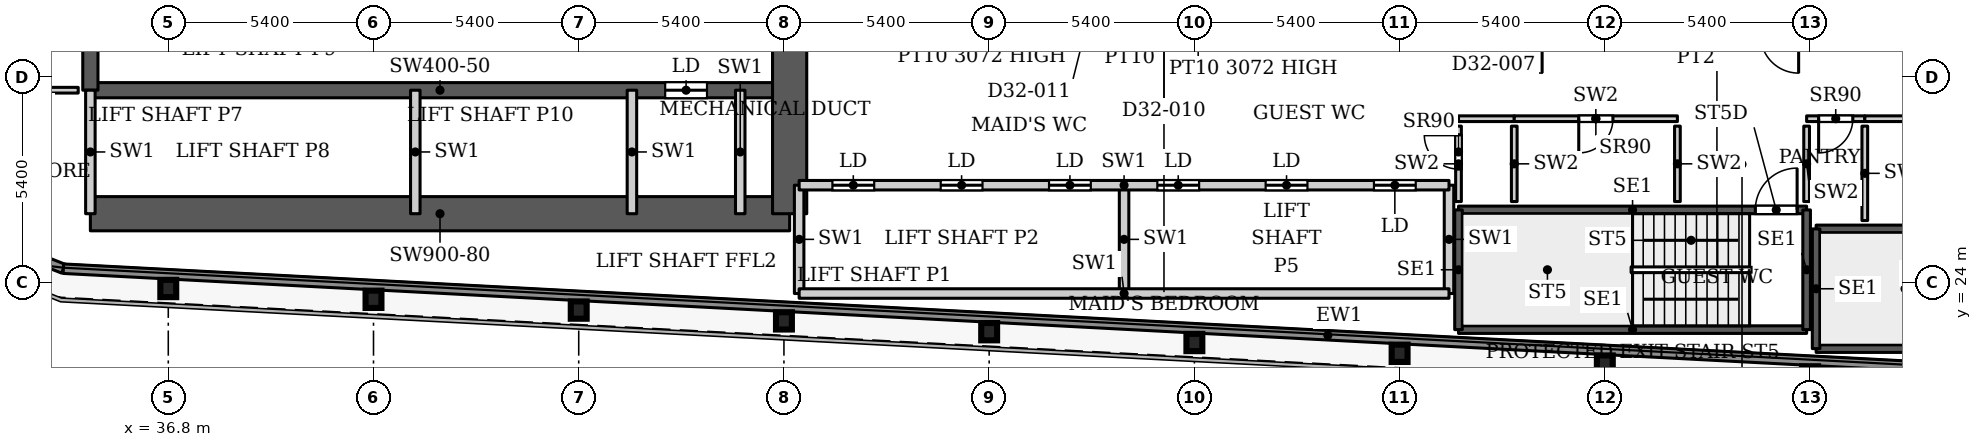
"""IFC4 building model, lengths in metres.
Left out: names, types, materials, properties, quantities, classifications, styles, units other than length and angle.
Written with IfcOpenShell. Run it as: python <this file> out.ifc"""

import sys

from ifc_helpers import new_model, si_unit, direction, frame, frame_2d, origin, origin_2d, place, context, subcontext, project, spatial, rectangle, i_section, extrude, source, transform, mapped, element, fill, save


model = new_model("IFC4")
c1 = context("Model", 3, precision=1e-05, world=origin(), true_north=direction((0.0, 1.0)))
c2 = subcontext(c1, "Body", "Model", "MODEL_VIEW")
j1 = project(units=[si_unit("LENGTHUNIT", "METRE"), si_unit("PLANEANGLEUNIT", "RADIAN")], contexts=[c1])
p1 = place(None, origin())
s1 = spatial("IfcSite", under=j1, at=p1, CompositionType="ELEMENT")
p2 = place(p1, origin())
s2 = spatial("IfcBuilding", under=s1, at=p2, CompositionType="ELEMENT")
p3 = place(p2, frame((0.0, 0.0, 137.0)))
s3 = spatial("IfcBuildingStorey", under=s2, at=p3, CompositionType="ELEMENT", Elevation=137.0)
for number, where, z_axis, x_axis in (
    (1, (80.0, 21.558, 0.0), (0.0, 0.0, 1.0), (1.0, 0.0, 0.0)),
    (2, (74.6, 21.843, 0.0), (0.0, 0.0, 1.0), (1.0, 0.0, 0.0)),
    (3, (69.2, 22.127, 0.0), (0.0, 0.0, 1.0), (1.0, 0.0, 0.0)),
    (4, (63.8, 22.411, 0.0), (0.0, 0.0, 1.0), (1.0, 0.0, 0.0)),
    (5, (58.4, 22.695, 0.0), (0.0, 0.0, 1.0), (1.0, 0.0, 0.0)),
    (6, (53.0, 22.98, 0.0), (0.0, 0.0, 1.0), (1.0, 0.0, 0.0)),
    (7, (47.6, 23.264, 0.0), (0.0, 0.0, 1.0), (1.0, 0.0, 0.0)),
    (8, (42.2, 23.548, 0.0), (0.0, 0.0, 1.0), (1.0, 0.0, 0.0)),
    (9, (36.8, 23.832, 0.0), (0.0, 0.0, 1.0), (1.0, 0.0, 0.0)),
):
    element("IfcColumn", number, at=place(p3, frame(where, z_axis=z_axis, x_axis=x_axis)), inside=s3, PredefinedType="COLUMN", context=c2, shape_type="SweptSolid", body=[
        extrude(i_section(OverallWidth=0.418, OverallDepth=0.455, WebThickness=0.042, FlangeThickness=0.068, FilletRadius=0.014, at=origin_2d()), origin(), (0.0, 0.0, 1.0), 3.9),
    ])
p4 = place(p3, frame((34.75, 25.8, 0.0), z_axis=(0.0, 0.0, 1.0), x_axis=(1.0, 0.0, 0.0)))
e10 = element("IfcWall", 10, at=p4, inside=s3, PredefinedType="SHEAR", context=c2, shape_type="SweptSolid", body=[
    extrude(rectangle(XDim=18.4, YDim=0.9, at=frame_2d((9.2, 0.0))), origin(), (0.0, 0.0, 1.0), 3.9),
])
p5 = place(p3, frame((34.75, 29.05, 0.0), z_axis=(0.0, 0.0, 1.0), x_axis=(1.0, 0.0, 0.0)))
e11 = element("IfcWall", 11, at=p5, inside=s3, PredefinedType="SHEAR", context=c2, shape_type="SweptSolid", body=[
    extrude(rectangle(XDim=18.4, YDim=0.4, at=frame_2d((9.2, 0.0))), origin(), (0.0, 0.0, 1.0), 3.9),
])
p6 = place(p5, frame((15.125, 0.0, 0.0)))
e12 = element("IfcOpeningElement", 12, at=p6, cuts=e11, PredefinedType="OPENING", context=c2, shape_type="SweptSolid", body=[
    extrude(rectangle(XDim=1.1, YDim=2.2, at=frame_2d((0.55, 1.1))), frame((0.0, 0.21, 0.0), z_axis=(0.0, -1.0, 0.0), x_axis=(1.0, 0.0, 0.0)), (0.0, 0.0, 1.0), 0.42),
])
p7 = place(p3, frame((34.75, 29.05, 0.0), z_axis=(0.0, 0.0, 1.0), x_axis=(0.0, 1.0, 0.0)))
e13 = element("IfcWall", 13, at=p7, inside=s3, PredefinedType="SHEAR", context=c2, shape_type="SweptSolid", body=[
    extrude(rectangle(XDim=18.45, YDim=0.4, at=frame_2d((9.225, 0.0))), origin(), (0.0, 0.0, 1.0), 3.9),
])
p8 = place(p7, frame((8.025, 0.0, 0.0)))
e14 = element("IfcOpeningElement", 14, at=p8, cuts=e13, PredefinedType="OPENING", context=c2, shape_type="SweptSolid", body=[
    extrude(rectangle(XDim=1.1, YDim=2.2, at=frame_2d((0.55, 1.1))), frame((0.0, 0.21, 0.0), z_axis=(0.0, -1.0, 0.0), x_axis=(1.0, 0.0, 0.0)), (0.0, 0.0, 1.0), 0.42),
])
p9 = place(p7, frame((10.875, 0.0, 0.0)))
e15 = element("IfcOpeningElement", 15, at=p9, cuts=e13, PredefinedType="OPENING", context=c2, shape_type="SweptSolid", body=[
    extrude(rectangle(XDim=1.1, YDim=2.2, at=frame_2d((0.55, 1.1))), frame((0.0, 0.21, 0.0), z_axis=(0.0, -1.0, 0.0), x_axis=(1.0, 0.0, 0.0)), (0.0, 0.0, 1.0), 0.42),
])
p10 = place(p7, frame((13.725, 0.0, 0.0)))
e16 = element("IfcOpeningElement", 16, at=p10, cuts=e13, PredefinedType="OPENING", context=c2, shape_type="SweptSolid", body=[
    extrude(rectangle(XDim=1.1, YDim=2.2, at=frame_2d((0.55, 1.1))), frame((0.0, 0.21, 0.0), z_axis=(0.0, -1.0, 0.0), x_axis=(1.0, 0.0, 0.0)), (0.0, 0.0, 1.0), 0.42),
])
p11 = place(p7, frame((15.95, 0.0, 0.0)))
e17 = element("IfcOpeningElement", 17, at=p11, cuts=e13, PredefinedType="OPENING", context=c2, shape_type="SweptSolid", body=[
    extrude(rectangle(XDim=1.1, YDim=2.2, at=frame_2d((0.55, 1.1))), frame((0.0, 0.21, 0.0), z_axis=(0.0, -1.0, 0.0), x_axis=(1.0, 0.0, 0.0)), (0.0, 0.0, 1.0), 0.42),
])
p12 = place(p3, frame((53.15, 25.8, 0.0), z_axis=(0.0, 0.0, 1.0), x_axis=(0.0, 1.0, 0.0)))
e18 = element("IfcWall", 18, at=p12, inside=s3, PredefinedType="SHEAR", context=c2, shape_type="SweptSolid", body=[
    extrude(rectangle(XDim=10.4, YDim=0.9, at=frame_2d((5.2, 0.0))), origin(), (0.0, 0.0, 1.0), 3.9),
])
p13 = place(p3, frame((34.039, 24.353, 0.0), z_axis=(0.0, 0.0, 1.0), x_axis=(-0.929352825399, 0.369192803184, 0.0)))
e19 = element("IfcWall", 19, at=p13, inside=s3, PredefinedType="SOLIDWALL", context=c2, shape_type="SweptSolid", body=[
    extrude(rectangle(XDim=4.656, YDim=0.25, at=frame_2d((2.328, 0.0))), origin(), (0.0, 0.0, 1.0), 3.75),
])
p14 = place(p3, frame((100.586, 20.85, 0.0), z_axis=(0.0, 0.0, 1.0), x_axis=(-0.99861746497, 0.052565755559, 0.0)))
e20 = element("IfcWall", 20, at=p14, inside=s3, PredefinedType="SOLIDWALL", context=c2, shape_type="SweptSolid", body=[
    extrude(rectangle(XDim=66.639, YDim=0.25, at=frame_2d((33.319, 0.0))), origin(), (0.0, 0.0, 1.0), 3.75),
])
p15 = place(p3, frame((80.16, 22.25, 0.0), z_axis=(0.0, 0.0, 1.0), x_axis=(1.0, 0.0, 0.0)))
e21 = element("IfcWall", 21, at=p15, inside=s3, PredefinedType="SHEAR", context=c2, shape_type="SweptSolid", body=[
    extrude(rectangle(XDim=9.16, YDim=0.2, at=frame_2d((4.58, 0.0))), origin(), (0.0, 0.0, 1.0), 3.9),
])
p16 = place(p3, frame((80.16, 25.4, 0.0), z_axis=(0.0, 0.0, 1.0), x_axis=(1.0, 0.0, 0.0)))
e22 = element("IfcWall", 22, at=p16, inside=s3, PredefinedType="SHEAR", context=c2, shape_type="SweptSolid", body=[
    extrude(rectangle(XDim=9.16, YDim=0.2, at=frame_2d((4.58, 0.0))), origin(), (0.0, 0.0, 1.0), 3.9),
])
p17 = place(p16, frame((7.81, 0.0, 0.0)))
e23 = element("IfcOpeningElement", 23, at=p17, cuts=e22, PredefinedType="OPENING", context=c2, shape_type="SweptSolid", body=[
    extrude(rectangle(XDim=1.1, YDim=2.2, at=frame_2d((0.55, 1.1))), frame((0.0, 0.11, 0.0), z_axis=(0.0, -1.0, 0.0), x_axis=(1.0, 0.0, 0.0)), (0.0, 0.0, 1.0), 0.22),
])
p18 = place(p3, frame((80.16, 22.25, 0.0), z_axis=(0.0, 0.0, 1.0), x_axis=(0.0, 1.0, 0.0)))
e24 = element("IfcWall", 24, at=p18, inside=s3, PredefinedType="SHEAR", context=c2, shape_type="SweptSolid", body=[
    extrude(rectangle(XDim=3.15, YDim=0.2, at=frame_2d((1.575, 0.0))), origin(), (0.0, 0.0, 1.0), 3.9),
])
p19 = place(p3, frame((70.75, 22.75, 0.0), z_axis=(0.0, 0.0, 1.0), x_axis=(1.0, 0.0, 0.0)))
e25 = element("IfcWall", 25, at=p19, inside=s3, PredefinedType="SHEAR", context=c2, shape_type="SweptSolid", body=[
    extrude(rectangle(XDim=9.16, YDim=0.2, at=frame_2d((4.58, 0.0))), origin(), (0.0, 0.0, 1.0), 3.9),
])
p20 = place(p3, frame((70.75, 25.9, 0.0), z_axis=(0.0, 0.0, 1.0), x_axis=(1.0, 0.0, 0.0)))
e26 = element("IfcWall", 26, at=p20, inside=s3, PredefinedType="SHEAR", context=c2, shape_type="SweptSolid", body=[
    extrude(rectangle(XDim=9.16, YDim=0.2, at=frame_2d((4.58, 0.0))), origin(), (0.0, 0.0, 1.0), 3.9),
])
p21 = place(p20, frame((7.81, 0.0, 0.0)))
e27 = element("IfcOpeningElement", 27, at=p21, cuts=e26, PredefinedType="OPENING", context=c2, shape_type="SweptSolid", body=[
    extrude(rectangle(XDim=1.1, YDim=2.2, at=frame_2d((0.55, 1.1))), frame((0.0, 0.11, 0.0), z_axis=(0.0, -1.0, 0.0), x_axis=(1.0, 0.0, 0.0)), (0.0, 0.0, 1.0), 0.22),
])
for number, where, z_axis, x_axis in (
    (28, (70.75, 22.75, 0.0), (0.0, 0.0, 1.0), (0.0, 1.0, 0.0)),
    (29, (79.91, 22.75, 0.0), (0.0, 0.0, 1.0), (0.0, 1.0, 0.0)),
):
    element("IfcWall", number, at=place(p3, frame(where, z_axis=z_axis, x_axis=x_axis)), inside=s3, PredefinedType="SHEAR", context=c2, shape_type="SweptSolid", body=[
        extrude(rectangle(XDim=3.15, YDim=0.2, at=frame_2d((1.575, 0.0))), origin(), (0.0, 0.0, 1.0), 3.9),
    ])
for number, where, z_axis, x_axis in (
    (30, (34.75, 25.8, 0.0), (0.0, 0.0, 1.0), (0.0, 1.0, 0.0)),
    (31, (43.3, 25.8, 0.0), (0.0, 0.0, 1.0), (0.0, 1.0, 0.0)),
    (32, (49.0, 25.8, 0.0), (0.0, 0.0, 1.0), (0.0, 1.0, 0.0)),
    (33, (51.85, 25.8, 0.0), (0.0, 0.0, 1.0), (0.0, 1.0, 0.0)),
):
    element("IfcWall", number, at=place(p3, frame(where, z_axis=z_axis, x_axis=x_axis)), inside=s3, PredefinedType="PARTITIONING", context=c2, shape_type="SweptSolid", body=[
        extrude(rectangle(XDim=3.25, YDim=0.25, at=frame_2d((1.625, 0.0))), origin(), (0.0, 0.0, 1.0), 3.9),
    ])
for number, where, z_axis, x_axis in (
    (34, (53.4, 23.7, 0.0), (0.0, 0.0, 1.0), (0.0, 1.0, 0.0)),
    (35, (61.95, 23.7, 0.0), (0.0, 0.0, 1.0), (0.0, 1.0, 0.0)),
    (36, (70.5, 23.7, 0.0), (0.0, 0.0, 1.0), (0.0, 1.0, 0.0)),
):
    element("IfcWall", number, at=place(p3, frame(where, z_axis=z_axis, x_axis=x_axis)), inside=s3, PredefinedType="PARTITIONING", context=c2, shape_type="SweptSolid", body=[
        extrude(rectangle(XDim=2.85, YDim=0.25, at=frame_2d((1.425, 0.0))), origin(), (0.0, 0.0, 1.0), 3.9),
    ])
p22 = place(p3, frame((53.4, 23.7, 0.0), z_axis=(0.0, 0.0, 1.0), x_axis=(1.0, 0.0, 0.0)))
e37 = element("IfcWall", 37, at=p22, inside=s3, PredefinedType="PARTITIONING", context=c2, shape_type="SweptSolid", body=[
    extrude(rectangle(XDim=17.1, YDim=0.25, at=frame_2d((8.55, 0.0))), origin(), (0.0, 0.0, 1.0), 3.9),
])
p23 = place(p3, frame((53.4, 26.55, 0.0), z_axis=(0.0, 0.0, 1.0), x_axis=(1.0, 0.0, 0.0)))
e38 = element("IfcWall", 38, at=p23, inside=s3, PredefinedType="PARTITIONING", context=c2, shape_type="SweptSolid", body=[
    extrude(rectangle(XDim=17.1, YDim=0.25, at=frame_2d((8.55, 0.0))), origin(), (0.0, 0.0, 1.0), 3.9),
])
p24 = place(p23, frame((0.875, 0.0, 0.0)))
e39 = element("IfcOpeningElement", 39, at=p24, cuts=e38, PredefinedType="OPENING", context=c2, shape_type="SweptSolid", body=[
    extrude(rectangle(XDim=1.1, YDim=2.2, at=frame_2d((0.55, 1.1))), frame((0.0, 0.135, 0.0), z_axis=(0.0, -1.0, 0.0), x_axis=(1.0, 0.0, 0.0)), (0.0, 0.0, 1.0), 0.27),
])
p25 = place(p23, frame((3.725, 0.0, 0.0)))
e40 = element("IfcOpeningElement", 40, at=p25, cuts=e38, PredefinedType="OPENING", context=c2, shape_type="SweptSolid", body=[
    extrude(rectangle(XDim=1.1, YDim=2.2, at=frame_2d((0.55, 1.1))), frame((0.0, 0.135, 0.0), z_axis=(0.0, -1.0, 0.0), x_axis=(1.0, 0.0, 0.0)), (0.0, 0.0, 1.0), 0.27),
])
p26 = place(p23, frame((6.575, 0.0, 0.0)))
e41 = element("IfcOpeningElement", 41, at=p26, cuts=e38, PredefinedType="OPENING", context=c2, shape_type="SweptSolid", body=[
    extrude(rectangle(XDim=1.1, YDim=2.2, at=frame_2d((0.55, 1.1))), frame((0.0, 0.135, 0.0), z_axis=(0.0, -1.0, 0.0), x_axis=(1.0, 0.0, 0.0)), (0.0, 0.0, 1.0), 0.27),
])
p27 = place(p23, frame((9.425, 0.0, 0.0)))
e42 = element("IfcOpeningElement", 42, at=p27, cuts=e38, PredefinedType="OPENING", context=c2, shape_type="SweptSolid", body=[
    extrude(rectangle(XDim=1.1, YDim=2.2, at=frame_2d((0.55, 1.1))), frame((0.0, 0.135, 0.0), z_axis=(0.0, -1.0, 0.0), x_axis=(1.0, 0.0, 0.0)), (0.0, 0.0, 1.0), 0.27),
])
p28 = place(p23, frame((12.275, 0.0, 0.0)))
e43 = element("IfcOpeningElement", 43, at=p28, cuts=e38, PredefinedType="OPENING", context=c2, shape_type="SweptSolid", body=[
    extrude(rectangle(XDim=1.1, YDim=2.2, at=frame_2d((0.55, 1.1))), frame((0.0, 0.135, 0.0), z_axis=(0.0, -1.0, 0.0), x_axis=(1.0, 0.0, 0.0)), (0.0, 0.0, 1.0), 0.27),
])
p29 = place(p23, frame((15.125, 0.0, 0.0)))
e44 = element("IfcOpeningElement", 44, at=p29, cuts=e38, PredefinedType="OPENING", context=c2, shape_type="SweptSolid", body=[
    extrude(rectangle(XDim=1.1, YDim=2.2, at=frame_2d((0.55, 1.1))), frame((0.0, 0.135, 0.0), z_axis=(0.0, -1.0, 0.0), x_axis=(1.0, 0.0, 0.0)), (0.0, 0.0, 1.0), 0.27),
])
p30 = place(p3, frame((31.07, 29.05, 0.0), z_axis=(0.0, 0.0, 1.0), x_axis=(1.0, 0.0, 0.0)))
e45 = element("IfcWall", 45, at=p30, inside=s3, PredefinedType="PARTITIONING", context=c2, shape_type="SweptSolid", body=[
    extrude(rectangle(XDim=3.36, YDim=0.15, at=frame_2d((1.68, 0.0))), origin(), (0.0, 0.0, 1.0), 3.9),
])
p31 = place(p30, frame((1.105, 0.0, 0.0)))
e46 = element("IfcOpeningElement", 46, at=p31, cuts=e45, PredefinedType="OPENING", context=c2, shape_type="SweptSolid", body=[
    extrude(rectangle(XDim=0.9, YDim=2.2, at=frame_2d((0.45, 1.1))), frame((0.0, 0.085, 0.0), z_axis=(0.0, -1.0, 0.0), x_axis=(1.0, 0.0, 0.0)), (0.0, 0.0, 1.0), 0.17),
])
p32 = place(p3, frame((70.75, 28.3, 0.0), z_axis=(0.0, 0.0, 1.0), x_axis=(1.0, 0.0, 0.0)))
e47 = element("IfcWall", 47, at=p32, inside=s3, PredefinedType="PARTITIONING", context=c2, shape_type="SweptSolid", body=[
    extrude(rectangle(XDim=1.467, YDim=0.15, at=frame_2d((0.733, 0.0))), origin(), (0.0, 0.0, 1.0), 3.9),
])
p33 = place(p3, frame((70.75, 26.12, 0.0), z_axis=(0.0, 0.0, 1.0), x_axis=(0.0, 1.0, 0.0)))
e48 = element("IfcWall", 48, at=p33, inside=s3, PredefinedType="PARTITIONING", context=c2, shape_type="SweptSolid", body=[
    extrude(rectangle(XDim=1.985, YDim=0.15, at=frame_2d((0.992, 0.0))), origin(), (0.0, 0.0, 1.0), 3.9),
])
p34 = place(p33, frame((0.855, 0.0, 0.0)))
e49 = element("IfcOpeningElement", 49, at=p34, cuts=e48, PredefinedType="OPENING", context=c2, shape_type="SweptSolid", body=[
    extrude(rectangle(XDim=0.9, YDim=2.2, at=frame_2d((0.45, 1.1))), frame((0.0, 0.085, 0.0), z_axis=(0.0, -1.0, 0.0), x_axis=(1.0, 0.0, 0.0)), (0.0, 0.0, 1.0), 0.17),
])
p35 = place(p3, frame((72.217, 26.12, 0.0), z_axis=(0.0, 0.0, 1.0), x_axis=(0.0, 1.0, 0.0)))
e50 = element("IfcWall", 50, at=p35, inside=s3, PredefinedType="PARTITIONING", context=c2, shape_type="SweptSolid", body=[
    extrude(rectangle(XDim=1.985, YDim=0.15, at=frame_2d((0.992, 0.0))), origin(), (0.0, 0.0, 1.0), 3.9),
])
p36 = place(p3, frame((72.217, 28.3, 0.0), z_axis=(0.0, 0.0, 1.0), x_axis=(1.0, 0.0, 0.0)))
e51 = element("IfcWall", 51, at=p36, inside=s3, PredefinedType="PARTITIONING", context=c2, shape_type="SweptSolid", body=[
    extrude(rectangle(XDim=4.293, YDim=0.15, at=frame_2d((2.146, 0.0))), origin(), (0.0, 0.0, 1.0), 3.9),
])
p37 = place(p36, frame((1.697, 0.0, 0.0)))
e52 = element("IfcOpeningElement", 52, at=p37, cuts=e51, PredefinedType="OPENING", context=c2, shape_type="SweptSolid", body=[
    extrude(rectangle(XDim=0.9, YDim=2.2, at=frame_2d((0.45, 1.1))), frame((0.0, 0.085, 0.0), z_axis=(0.0, -1.0, 0.0), x_axis=(1.0, 0.0, 0.0)), (0.0, 0.0, 1.0), 0.17),
])
p38 = place(p3, frame((76.51, 26.12, 0.0), z_axis=(0.0, 0.0, 1.0), x_axis=(0.0, 1.0, 0.0)))
e53 = element("IfcWall", 53, at=p38, inside=s3, PredefinedType="PARTITIONING", context=c2, shape_type="SweptSolid", body=[
    extrude(rectangle(XDim=1.985, YDim=0.15, at=frame_2d((0.992, 0.0))), origin(), (0.0, 0.0, 1.0), 3.9),
])
p39 = place(p3, frame((79.91, 28.3, 0.0), z_axis=(0.0, 0.0, 1.0), x_axis=(1.0, 0.0, 0.0)))
e54 = element("IfcWall", 54, at=p39, inside=s3, PredefinedType="PARTITIONING", context=c2, shape_type="SweptSolid", body=[
    extrude(rectangle(XDim=1.531, YDim=0.15, at=frame_2d((0.766, 0.0))), origin(), (0.0, 0.0, 1.0), 3.9),
])
p40 = place(p39, frame((0.316, 0.0, 0.0)))
e55 = element("IfcOpeningElement", 55, at=p40, cuts=e54, PredefinedType="OPENING", context=c2, shape_type="SweptSolid", body=[
    extrude(rectangle(XDim=0.9, YDim=2.2, at=frame_2d((0.45, 1.1))), frame((0.0, 0.085, 0.0), z_axis=(0.0, -1.0, 0.0), x_axis=(1.0, 0.0, 0.0)), (0.0, 0.0, 1.0), 0.17),
])
p41 = place(p3, frame((79.91, 26.12, 0.0), z_axis=(0.0, 0.0, 1.0), x_axis=(0.0, 1.0, 0.0)))
e56 = element("IfcWall", 56, at=p41, inside=s3, PredefinedType="PARTITIONING", context=c2, shape_type="SweptSolid", body=[
    extrude(rectangle(XDim=1.985, YDim=0.15, at=frame_2d((0.992, 0.0))), origin(), (0.0, 0.0, 1.0), 3.9),
])
p42 = place(p3, frame((81.441, 25.62, 0.0), z_axis=(0.0, 0.0, 1.0), x_axis=(0.0, 1.0, 0.0)))
e57 = element("IfcWall", 57, at=p42, inside=s3, PredefinedType="PARTITIONING", context=c2, shape_type="SweptSolid", body=[
    extrude(rectangle(XDim=2.485, YDim=0.15, at=frame_2d((1.242, 0.0))), origin(), (0.0, 0.0, 1.0), 3.9),
])
p43 = place(p3, frame((81.441, 28.3, 0.0), z_axis=(0.0, 0.0, 1.0), x_axis=(1.0, 0.0, 0.0)))
e58 = element("IfcWall", 58, at=p43, inside=s3, PredefinedType="PARTITIONING", context=c2, shape_type="SweptSolid", body=[
    extrude(rectangle(XDim=4.479, YDim=0.15, at=frame_2d((2.24, 0.0))), origin(), (0.0, 0.0, 1.0), 3.9),
])
p44 = place(p43, frame((1.789, 0.0, 0.0)))
e59 = element("IfcOpeningElement", 59, at=p44, cuts=e58, PredefinedType="OPENING", context=c2, shape_type="SweptSolid", body=[
    extrude(rectangle(XDim=0.9, YDim=2.2, at=frame_2d((0.45, 1.1))), frame((0.0, 0.085, 0.0), z_axis=(0.0, -1.0, 0.0), x_axis=(1.0, 0.0, 0.0)), (0.0, 0.0, 1.0), 0.17),
])
m1 = source(origin(), c2, "Body", "SweptSolid", [
    extrude(rectangle(XDim=1.1, YDim=2.2, at=frame_2d((0.55, 1.1))), frame((0.0, 0.025, 0.0), z_axis=(0.0, -1.0, 0.0), x_axis=(1.0, 0.0, 0.0)), (0.0, 0.0, 1.0), 0.05),
])
p45 = place(p24, origin())
e60 = element("IfcDoor", 60, at=p45, inside=s3, OperationType="SLIDING_TO_LEFT", PredefinedType="DOOR", context=c2, shape_type="MappedRepresentation", body=[
    mapped(m1, transform((0.0, 0.0, 0.0), x_axis=(1.0, 0.0, 0.0), y_axis=(0.0, 1.0, 0.0), z_axis=(0.0, 0.0, 1.0), scale=1.0)),
])
fill(e39, e60)
p46 = place(p25, origin())
e61 = element("IfcDoor", 61, at=p46, inside=s3, OperationType="SLIDING_TO_LEFT", PredefinedType="DOOR", context=c2, shape_type="MappedRepresentation", body=[
    mapped(m1, transform((0.0, 0.0, 0.0), x_axis=(1.0, 0.0, 0.0), y_axis=(0.0, 1.0, 0.0), z_axis=(0.0, 0.0, 1.0), scale=1.0)),
])
fill(e40, e61)
p47 = place(p26, origin())
e62 = element("IfcDoor", 62, at=p47, inside=s3, OperationType="SLIDING_TO_LEFT", PredefinedType="DOOR", context=c2, shape_type="MappedRepresentation", body=[
    mapped(m1, transform((0.0, 0.0, 0.0), x_axis=(1.0, 0.0, 0.0), y_axis=(0.0, 1.0, 0.0), z_axis=(0.0, 0.0, 1.0), scale=1.0)),
])
fill(e41, e62)
p48 = place(p27, origin())
e63 = element("IfcDoor", 63, at=p48, inside=s3, OperationType="SLIDING_TO_LEFT", PredefinedType="DOOR", context=c2, shape_type="MappedRepresentation", body=[
    mapped(m1, transform((0.0, 0.0, 0.0), x_axis=(1.0, 0.0, 0.0), y_axis=(0.0, 1.0, 0.0), z_axis=(0.0, 0.0, 1.0), scale=1.0)),
])
fill(e42, e63)
p49 = place(p28, origin())
e64 = element("IfcDoor", 64, at=p49, inside=s3, OperationType="SLIDING_TO_LEFT", PredefinedType="DOOR", context=c2, shape_type="MappedRepresentation", body=[
    mapped(m1, transform((0.0, 0.0, 0.0), x_axis=(1.0, 0.0, 0.0), y_axis=(0.0, 1.0, 0.0), z_axis=(0.0, 0.0, 1.0), scale=1.0)),
])
fill(e43, e64)
p50 = place(p29, origin())
e65 = element("IfcDoor", 65, at=p50, inside=s3, OperationType="SLIDING_TO_LEFT", PredefinedType="DOOR", context=c2, shape_type="MappedRepresentation", body=[
    mapped(m1, transform((0.0, 0.0, 0.0), x_axis=(1.0, 0.0, 0.0), y_axis=(0.0, 1.0, 0.0), z_axis=(0.0, 0.0, 1.0), scale=1.0)),
])
fill(e44, e65)
p51 = place(p6, origin())
e66 = element("IfcDoor", 66, at=p51, inside=s3, OperationType="SLIDING_TO_LEFT", PredefinedType="DOOR", context=c2, shape_type="MappedRepresentation", body=[
    mapped(m1, transform((0.0, 0.0, 0.0), x_axis=(1.0, 0.0, 0.0), y_axis=(0.0, 1.0, 0.0), z_axis=(0.0, 0.0, 1.0), scale=1.0)),
])
fill(e12, e66)
m2 = source(origin(), c2, "Body", "SweptSolid", [
    extrude(rectangle(XDim=0.9, YDim=2.2, at=frame_2d((0.45, 1.1))), frame((0.0, 0.025, 0.0), z_axis=(0.0, -1.0, 0.0), x_axis=(1.0, 0.0, 0.0)), (0.0, 0.0, 1.0), 0.05),
])
p52 = place(p34, origin())
e67 = element("IfcDoor", 67, at=p52, inside=s3, OperationType="SINGLE_SWING_LEFT", PredefinedType="DOOR", context=c2, shape_type="MappedRepresentation", body=[
    mapped(m2, transform((0.0, 0.0, 0.0), x_axis=(1.0, 0.0, 0.0), y_axis=(0.0, 1.0, 0.0), z_axis=(0.0, 0.0, 1.0), scale=1.0)),
])
fill(e49, e67)
p53 = place(p37, origin())
e68 = element("IfcDoor", 68, at=p53, inside=s3, OperationType="SINGLE_SWING_RIGHT", PredefinedType="DOOR", context=c2, shape_type="MappedRepresentation", body=[
    mapped(m2, transform((0.0, 0.0, 0.0), x_axis=(1.0, 0.0, 0.0), y_axis=(0.0, 1.0, 0.0), z_axis=(0.0, 0.0, 1.0), scale=1.0)),
])
fill(e52, e68)
p54 = place(p40, origin())
e69 = element("IfcDoor", 69, at=p54, inside=s3, OperationType="SINGLE_SWING_RIGHT", PredefinedType="DOOR", context=c2, shape_type="MappedRepresentation", body=[
    mapped(m2, transform((0.0, 0.0, 0.0), x_axis=(1.0, 0.0, 0.0), y_axis=(0.0, 1.0, 0.0), z_axis=(0.0, 0.0, 1.0), scale=1.0)),
])
fill(e55, e69)
m3 = source(origin(), c2, "Body", "SweptSolid", [
    extrude(rectangle(XDim=1.1, YDim=2.2, at=frame_2d((0.55, 1.1))), frame((0.0, 0.025, 0.0), z_axis=(0.0, -1.0, 0.0), x_axis=(1.0, 0.0, 0.0)), (0.0, 0.0, 1.0), 0.05),
])
p55 = place(p21, origin())
e70 = element("IfcDoor", 70, at=p55, inside=s3, OperationType="SINGLE_SWING_LEFT", PredefinedType="DOOR", context=c2, shape_type="MappedRepresentation", body=[
    mapped(m3, transform((0.0, 0.0, 0.0), x_axis=(1.0, 0.0, 0.0), y_axis=(0.0, 1.0, 0.0), z_axis=(0.0, 0.0, 1.0), scale=1.0)),
])
fill(e27, e70)
save(model, sys.argv[1])
